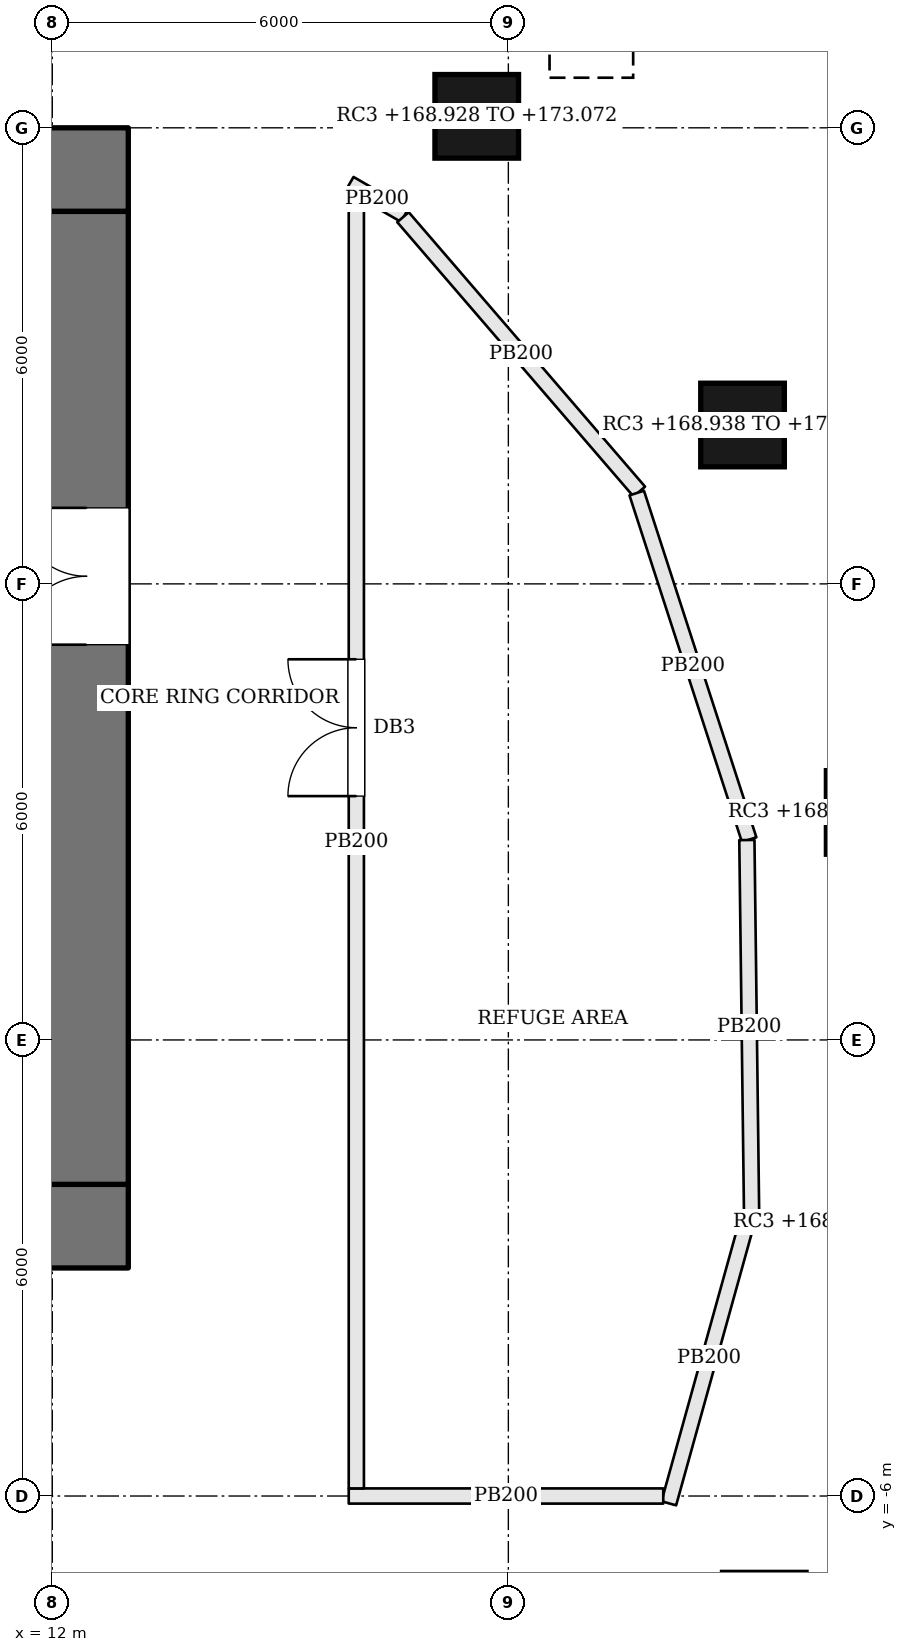
"""IFC4 building model, lengths in metres.
Left out: names, types, materials, properties, quantities, classifications, styles, units other than length and angle.
Written with IfcOpenShell. Run it as: python <this file> out.ifc"""

import sys

from ifc_helpers import new_model, si_unit, direction, frame, frame_2d, origin, origin_2d, place, context, subcontext, project, spatial, rectangle, extrude, element, fill, save


model = new_model("IFC4")
c1 = context("Model", 3, precision=1e-05, world=origin(), true_north=direction((0.0, 1.0)))
c2 = subcontext(c1, "Body", "Model", "MODEL_VIEW")
j1 = project(units=[si_unit("LENGTHUNIT", "METRE"), si_unit("PLANEANGLEUNIT", "RADIAN")], contexts=[c1])
p1 = place(None, origin())
s1 = spatial("IfcSite", under=j1, at=p1, CompositionType="ELEMENT")
p2 = place(p1, origin())
s2 = spatial("IfcBuilding", under=s1, at=p2, CompositionType="ELEMENT")
p3 = place(p2, frame((0.0, 0.0, 169.5)))
s3 = spatial("IfcBuildingStorey", under=s2, at=p3, CompositionType="ELEMENT", Elevation=169.5)
p4 = place(p3, frame((-13.0, 11.45, 0.0), z_axis=(0.0, 0.0, 1.0), x_axis=(1.0, 0.0, 0.0)))
e1 = element("IfcWall", 1, at=p4, inside=s3, PredefinedType="SHEAR", context=c2, shape_type="SweptSolid", body=[
    extrude(rectangle(XDim=26.0, YDim=1.1, at=frame_2d((13.0, 0.0))), origin(), (0.0, 0.0, 1.0), 4.5),
])
p5 = place(p4, frame((9.125, 0.0, 0.0)))
e2 = element("IfcOpeningElement", 2, at=p5, cuts=e1, PredefinedType="OPENING", context=c2, shape_type="SweptSolid", body=[
    extrude(rectangle(XDim=1.2, YDim=2.1, at=frame_2d((0.6, 1.05))), frame((0.0, 0.56, 0.0), z_axis=(0.0, -1.0, 0.0), x_axis=(1.0, 0.0, 0.0)), (0.0, 0.0, 1.0), 1.12),
])
p6 = place(p4, frame((12.375, 0.0, 0.0)))
e3 = element("IfcOpeningElement", 3, at=p6, cuts=e1, PredefinedType="OPENING", context=c2, shape_type="SweptSolid", body=[
    extrude(rectangle(XDim=1.2, YDim=2.1, at=frame_2d((0.6, 1.05))), frame((0.0, 0.56, 0.0), z_axis=(0.0, -1.0, 0.0), x_axis=(1.0, 0.0, 0.0)), (0.0, 0.0, 1.0), 1.12),
])
p7 = place(p4, frame((15.9, 0.0, 0.0)))
e4 = element("IfcOpeningElement", 4, at=p7, cuts=e1, PredefinedType="OPENING", context=c2, shape_type="SweptSolid", body=[
    extrude(rectangle(XDim=0.7, YDim=2.1, at=frame_2d((0.35, 1.05))), frame((0.0, 0.56, 0.0), z_axis=(0.0, -1.0, 0.0), x_axis=(1.0, 0.0, 0.0)), (0.0, 0.0, 1.0), 1.12),
])
p8 = place(p4, frame((6.88, 0.0, 0.0)))
e5 = element("IfcOpeningElement", 5, at=p8, cuts=e1, PredefinedType="OPENING", context=c2, shape_type="SweptSolid", body=[
    extrude(rectangle(XDim=1.0, YDim=2.1, at=frame_2d((0.5, 1.05))), frame((0.0, 0.56, 0.0), z_axis=(0.0, -1.0, 0.0), x_axis=(1.0, 0.0, 0.0)), (0.0, 0.0, 1.0), 1.12),
])
p9 = place(p4, frame((18.12, 0.0, 0.0)))
e6 = element("IfcOpeningElement", 6, at=p9, cuts=e1, PredefinedType="OPENING", context=c2, shape_type="SweptSolid", body=[
    extrude(rectangle(XDim=1.0, YDim=2.1, at=frame_2d((0.5, 1.05))), frame((0.0, 0.56, 0.0), z_axis=(0.0, -1.0, 0.0), x_axis=(1.0, 0.0, 0.0)), (0.0, 0.0, 1.0), 1.12),
])
p10 = place(p3, frame((-13.0, -2.45, 0.0), z_axis=(0.0, 0.0, 1.0), x_axis=(1.0, 0.0, 0.0)))
e7 = element("IfcWall", 7, at=p10, inside=s3, PredefinedType="SHEAR", context=c2, shape_type="SweptSolid", body=[
    extrude(rectangle(XDim=26.0, YDim=1.1, at=frame_2d((13.0, 0.0))), origin(), (0.0, 0.0, 1.0), 4.5),
])
p11 = place(p10, frame((8.975, 0.0, 0.0)))
e8 = element("IfcOpeningElement", 8, at=p11, cuts=e7, PredefinedType="OPENING", context=c2, shape_type="SweptSolid", body=[
    extrude(rectangle(XDim=0.7, YDim=2.1, at=frame_2d((0.35, 1.05))), frame((0.0, 0.56, 0.0), z_axis=(0.0, -1.0, 0.0), x_axis=(1.0, 0.0, 0.0)), (0.0, 0.0, 1.0), 1.12),
])
p12 = place(p10, frame((12.0, 0.0, 0.0)))
e9 = element("IfcOpeningElement", 9, at=p12, cuts=e7, PredefinedType="OPENING", context=c2, shape_type="SweptSolid", body=[
    extrude(rectangle(XDim=1.2, YDim=2.1, at=frame_2d((0.6, 1.05))), frame((0.0, 0.56, 0.0), z_axis=(0.0, -1.0, 0.0), x_axis=(1.0, 0.0, 0.0)), (0.0, 0.0, 1.0), 1.12),
])
p13 = place(p10, frame((15.675, 0.0, 0.0)))
e10 = element("IfcOpeningElement", 10, at=p13, cuts=e7, PredefinedType="OPENING", context=c2, shape_type="SweptSolid", body=[
    extrude(rectangle(XDim=1.2, YDim=2.1, at=frame_2d((0.6, 1.05))), frame((0.0, 0.56, 0.0), z_axis=(0.0, -1.0, 0.0), x_axis=(1.0, 0.0, 0.0)), (0.0, 0.0, 1.0), 1.12),
])
p14 = place(p10, frame((6.88, 0.0, 0.0)))
e11 = element("IfcOpeningElement", 11, at=p14, cuts=e7, PredefinedType="OPENING", context=c2, shape_type="SweptSolid", body=[
    extrude(rectangle(XDim=1.0, YDim=2.1, at=frame_2d((0.5, 1.05))), frame((0.0, 0.56, 0.0), z_axis=(0.0, -1.0, 0.0), x_axis=(1.0, 0.0, 0.0)), (0.0, 0.0, 1.0), 1.12),
])
p15 = place(p10, frame((18.12, 0.0, 0.0)))
e12 = element("IfcOpeningElement", 12, at=p15, cuts=e7, PredefinedType="OPENING", context=c2, shape_type="SweptSolid", body=[
    extrude(rectangle(XDim=1.0, YDim=2.1, at=frame_2d((0.5, 1.05))), frame((0.0, 0.56, 0.0), z_axis=(0.0, -1.0, 0.0), x_axis=(1.0, 0.0, 0.0)), (0.0, 0.0, 1.0), 1.12),
])
p16 = place(p3, frame((12.45, -1.9, 0.0), z_axis=(0.0, 0.0, 1.0), x_axis=(0.0, 1.0, 0.0)))
e13 = element("IfcWall", 13, at=p16, inside=s3, PredefinedType="SHEAR", context=c2, shape_type="SweptSolid", body=[
    extrude(rectangle(XDim=12.8, YDim=1.1, at=frame_2d((6.4, 0.0))), origin(), (0.0, 0.0, 1.0), 4.5),
])
p17 = place(p16, frame((7.1, 0.0, 0.0)))
e14 = element("IfcOpeningElement", 14, at=p17, cuts=e13, PredefinedType="OPENING", context=c2, shape_type="SweptSolid", body=[
    extrude(rectangle(XDim=1.8, YDim=2.1, at=frame_2d((0.9, 1.05))), frame((0.0, 0.56, 0.0), z_axis=(0.0, -1.0, 0.0), x_axis=(1.0, 0.0, 0.0)), (0.0, 0.0, 1.0), 1.12),
])
p18 = place(p3, frame((22.734, 2.993, -0.56), z_axis=(0.424443684134, 0.055960591713, 0.903723393066), x_axis=(-0.130713362485, 0.991420201967, 0.0)))
e15 = element("IfcColumn", 15, at=p18, inside=s3, PredefinedType="COLUMN", context=c2, shape_type="SweptSolid", body=[
    extrude(rectangle(XDim=1.1, YDim=1.1, at=origin_2d()), origin(), (0.0, 0.0, 1.0), 4.559),
])
p19 = place(p3, frame((21.081, 8.09, -0.562), z_axis=(0.394911202238, 0.153105850406, 0.90587181263), x_axis=(-0.361480683506, 0.932379598367, 0.0)))
e16 = element("IfcColumn", 16, at=p19, inside=s3, PredefinedType="COLUMN", context=c2, shape_type="SweptSolid", body=[
    extrude(rectangle(XDim=1.1, YDim=1.1, at=origin_2d()), origin(), (0.0, 0.0, 1.0), 4.552),
])
p20 = place(p3, frame((17.584, 12.151, -0.572), z_axis=(0.332531725465, 0.233315929766, 0.91377586337), x_axis=(-0.574360318683, 0.818602604639, 0.0)))
e17 = element("IfcColumn", 17, at=p20, inside=s3, PredefinedType="COLUMN", context=c2, shape_type="SweptSolid", body=[
    extrude(rectangle(XDim=1.1, YDim=1.1, at=origin_2d()), origin(), (0.0, 0.0, 1.0), 4.535),
])
p21 = place(p3, frame((21.367, -7.554, -0.562), z_axis=(0.399191098606, -0.144034709541, 0.905483555478), x_axis=(0.339399243932, 0.940642415171, 0.0)))
e18 = element("IfcColumn", 18, at=p21, inside=s3, PredefinedType="COLUMN", context=c2, shape_type="SweptSolid", body=[
    extrude(rectangle(XDim=1.1, YDim=1.1, at=origin_2d()), origin(), (0.0, 0.0, 1.0), 4.554),
])
p22 = place(p3, frame((24.077, 12.194, 0.0), z_axis=(0.0, 0.0, 1.0), x_axis=(-0.69406513137, 0.719912212298, 0.0)))
e19 = element("IfcWall", 19, at=p22, inside=s3, PredefinedType="SOLIDWALL", context=c2, shape_type="SweptSolid", body=[
    extrude(rectangle(XDim=4.298, YDim=0.45, at=frame_2d((2.149, 0.0))), origin(), (0.0, 0.0, 1.0), 4.3),
])
p23 = place(p22, frame((1.099, 0.0, 1.2)))
e20 = element("IfcOpeningElement", 20, at=p23, cuts=e19, PredefinedType="OPENING", context=c2, shape_type="SweptSolid", body=[
    extrude(rectangle(XDim=2.1, YDim=1.8, at=frame_2d((1.05, 0.9))), frame((0.0, 0.235, 0.0), z_axis=(0.0, -1.0, 0.0), x_axis=(1.0, 0.0, 0.0)), (0.0, 0.0, 1.0), 0.47),
])
p24 = place(p3, frame((15.913, 11.267, 0.0), z_axis=(0.0, 0.0, 1.0), x_axis=(0.866219676164, -0.4996633593, 0.0)))
e21 = element("IfcWall", 21, at=p24, inside=s3, PredefinedType="PARTITIONING", context=c2, shape_type="SweptSolid", body=[
    extrude(rectangle(XDim=0.834, YDim=0.2, at=frame_2d((0.417, 0.0))), origin(), (0.0, 0.0, 1.0), 4.3),
])
p25 = place(p3, frame((16.614, 10.824, 0.0), z_axis=(0.0, 0.0, 1.0), x_axis=(0.652570543166, -0.757727976382, 0.0)))
e22 = element("IfcWall", 22, at=p25, inside=s3, PredefinedType="PARTITIONING", context=c2, shape_type="SweptSolid", body=[
    extrude(rectangle(XDim=4.764, YDim=0.2, at=frame_2d((2.382, 0.0))), origin(), (0.0, 0.0, 1.0), 4.3),
])
p26 = place(p3, frame((19.689, 7.195, 0.0), z_axis=(0.0, 0.0, 1.0), x_axis=(0.308517152125, -0.951218779695, 0.0)))
e23 = element("IfcWall", 23, at=p26, inside=s3, PredefinedType="PARTITIONING", context=c2, shape_type="SweptSolid", body=[
    extrude(rectangle(XDim=4.794, YDim=0.2, at=frame_2d((2.397, 0.0))), origin(), (0.0, 0.0, 1.0), 4.3),
])
p27 = place(p3, frame((21.138, 2.63, 0.0), z_axis=(0.0, 0.0, 1.0), x_axis=(0.012626385888, -0.999920284012, 0.0)))
e24 = element("IfcWall", 24, at=p27, inside=s3, PredefinedType="PARTITIONING", context=c2, shape_type="SweptSolid", body=[
    extrude(rectangle(XDim=4.911, YDim=0.2, at=frame_2d((2.456, 0.0))), origin(), (0.0, 0.0, 1.0), 4.3),
])
p28 = place(p3, frame((21.172, -2.277, 0.0), z_axis=(0.0, 0.0, 1.0), x_axis=(-0.267701048026, -0.963502023291, 0.0)))
e25 = element("IfcWall", 25, at=p28, inside=s3, PredefinedType="PARTITIONING", context=c2, shape_type="SweptSolid", body=[
    extrude(rectangle(XDim=3.964, YDim=0.2, at=frame_2d((1.982, 0.0))), origin(), (0.0, 0.0, 1.0), 4.3),
])
p29 = place(p3, frame((20.038, -6.0, 0.0), z_axis=(0.0, 0.0, 1.0), x_axis=(-1.0, 0.0, 0.0)))
e26 = element("IfcWall", 26, at=p29, inside=s3, PredefinedType="PARTITIONING", context=c2, shape_type="SweptSolid", body=[
    extrude(rectangle(XDim=4.138, YDim=0.2, at=frame_2d((2.069, 0.0))), origin(), (0.0, 0.0, 1.0), 4.3),
])
p30 = place(p3, frame((16.0, -5.9, 0.0), z_axis=(0.0, 0.0, 1.0), x_axis=(0.0, 1.0, 0.0)))
e27 = element("IfcWall", 27, at=p30, inside=s3, PredefinedType="PARTITIONING", context=c2, shape_type="SweptSolid", body=[
    extrude(rectangle(XDim=17.017, YDim=0.2, at=frame_2d((8.508, 0.0))), origin(), (0.0, 0.0, 1.0), 4.3),
])
p31 = place(p30, frame((9.108, 0.0, 0.0)))
e28 = element("IfcOpeningElement", 28, at=p31, cuts=e27, PredefinedType="OPENING", context=c2, shape_type="SweptSolid", body=[
    extrude(rectangle(XDim=1.8, YDim=2.1, at=frame_2d((0.9, 1.05))), frame((0.0, 0.11, 0.0), z_axis=(0.0, -1.0, 0.0), x_axis=(1.0, 0.0, 0.0)), (0.0, 0.0, 1.0), 0.22),
])
p32 = place(p23, origin())
e29 = element("IfcWindow", 29, at=p32, inside=s3, PartitioningType="SINGLE_PANEL", PredefinedType="WINDOW", context=c2, shape_type="SweptSolid", body=[
    extrude(rectangle(XDim=2.1, YDim=1.8, at=frame_2d((1.05, 0.9))), frame((0.0, 0.135, 0.0), z_axis=(0.0, -1.0, 0.0), x_axis=(1.0, 0.0, 0.0)), (0.0, 0.0, 1.0), 0.06),
])
fill(e20, e29)
p33 = place(p17, origin())
e30 = element("IfcDoor", 30, at=p33, inside=s3, OperationType="DOUBLE_DOOR_SINGLE_SWING", PredefinedType="DOOR", context=c2, shape_type="SweptSolid", body=[
    extrude(rectangle(XDim=1.8, YDim=2.1, at=frame_2d((0.9, 1.05))), frame((0.0, 0.025, 0.0), z_axis=(0.0, -1.0, 0.0), x_axis=(1.0, 0.0, 0.0)), (0.0, 0.0, 1.0), 0.05),
])
fill(e14, e30)
p34 = place(p31, origin())
e31 = element("IfcDoor", 31, at=p34, inside=s3, OperationType="DOUBLE_DOOR_SINGLE_SWING", PredefinedType="DOOR", context=c2, shape_type="SweptSolid", body=[
    extrude(rectangle(XDim=1.8, YDim=2.1, at=frame_2d((0.9, 1.05))), frame((0.0, 0.025, 0.0), z_axis=(0.0, -1.0, 0.0), x_axis=(1.0, 0.0, 0.0)), (0.0, 0.0, 1.0), 0.05),
])
fill(e28, e31)
save(model, sys.argv[1])
